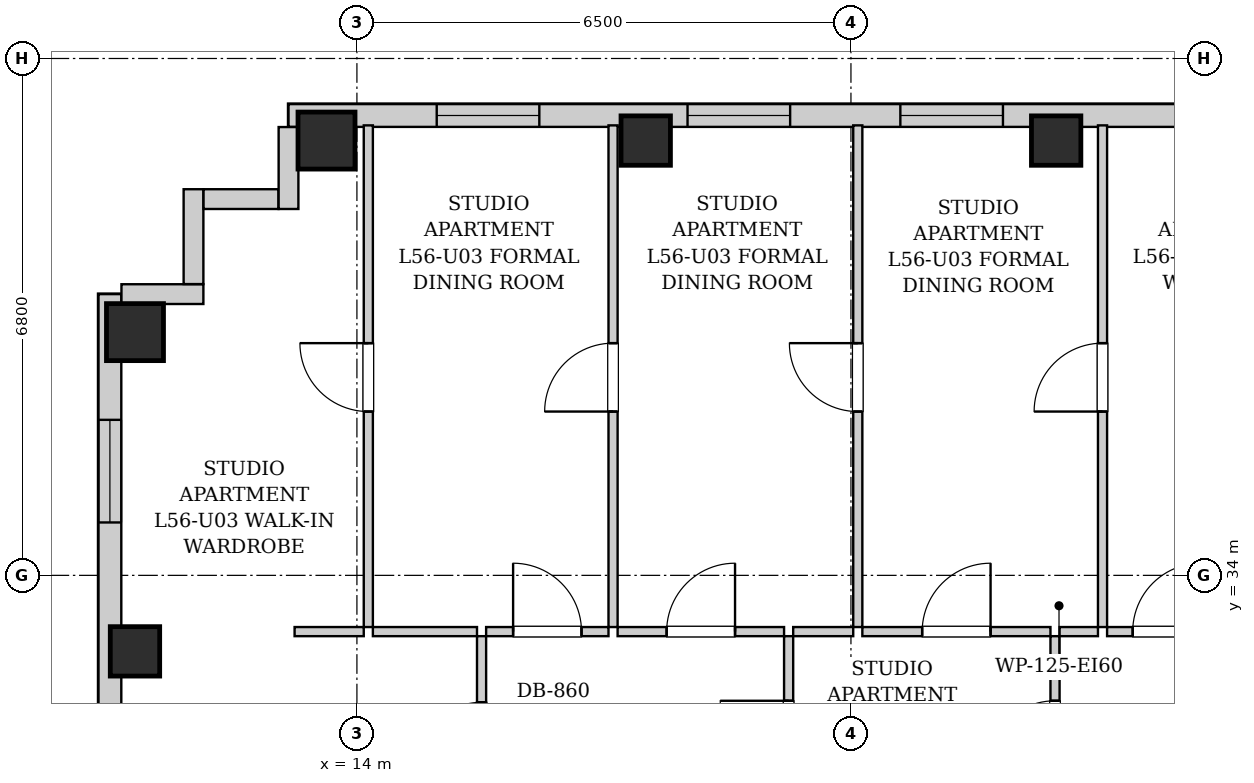
"""IFC4 building model, lengths in metres.
Left out: names, types, materials, properties, quantities, classifications, styles, units other than length and angle.
Written with IfcOpenShell. Run it as: python <this file> out.ifc"""

import sys

from ifc_helpers import new_model, si_unit, direction, frame, frame_2d, origin, origin_2d, place, context, subcontext, project, spatial, rectangle, extrude, element, fill, save


model = new_model("IFC4")
c1 = context("Model", 3, precision=1e-05, world=origin(), true_north=direction((0.0, 1.0)))
c2 = subcontext(c1, "Body", "Model", "MODEL_VIEW")
j1 = project(units=[si_unit("LENGTHUNIT", "METRE"), si_unit("PLANEANGLEUNIT", "RADIAN")], contexts=[c1])
p1 = place(None, origin())
s1 = spatial("IfcSite", under=j1, at=p1, CompositionType="ELEMENT")
p2 = place(p1, origin())
s2 = spatial("IfcBuilding", under=s1, at=p2, CompositionType="ELEMENT")
p3 = place(p2, frame((0.0, 0.0, 194.2)))
s3 = spatial("IfcBuildingStorey", under=s2, at=p3, CompositionType="ELEMENT", Elevation=194.2)
p4 = place(p3, frame((13.6, 39.72, 0.0), z_axis=(0.0, 0.0, 1.0), x_axis=(1.0, 0.0, 0.0)))
e1 = element("IfcColumn", 1, at=p4, inside=s3, PredefinedType="COLUMN", context=c2, shape_type="SweptSolid", body=[
    extrude(rectangle(XDim=0.75, YDim=0.75, at=origin_2d()), origin(), (0.0, 0.0, 1.0), 3.3),
])
for number, where, z_axis, x_axis in (
    (2, (17.8, 39.72, 0.0), (0.0, 0.0, 1.0), (1.0, 0.0, 0.0)),
    (3, (23.2, 39.72, 0.0), (0.0, 0.0, 1.0), (1.0, 0.0, 0.0)),
    (4, (11.08, 33.0, 0.0), (0.0, 0.0, 1.0), (1.0, 0.0, 0.0)),
):
    element("IfcColumn", number, at=place(p3, frame(where, z_axis=z_axis, x_axis=x_axis)), inside=s3, PredefinedType="COLUMN", context=c2, shape_type="SweptSolid", body=[
        extrude(rectangle(XDim=0.65, YDim=0.65, at=origin_2d()), origin(), (0.0, 0.0, 1.0), 3.3),
    ])
p5 = place(p3, frame((11.08, 37.2, 0.0), z_axis=(0.0, 0.0, 1.0), x_axis=(1.0, 0.0, 0.0)))
e5 = element("IfcColumn", 5, at=p5, inside=s3, PredefinedType="COLUMN", context=c2, shape_type="SweptSolid", body=[
    extrude(rectangle(XDim=0.75, YDim=0.75, at=origin_2d()), origin(), (0.0, 0.0, 1.0), 3.3),
])
p6 = place(p3, frame((13.1, 40.05, 0.0), z_axis=(0.0, 0.0, 1.0), x_axis=(1.0, 0.0, 0.0)))
e6 = element("IfcWall", 6, at=p6, inside=s3, PredefinedType="SOLIDWALL", context=c2, shape_type="SweptSolid", body=[
    extrude(rectangle(XDim=17.7, YDim=0.3, at=frame_2d((8.85, 0.0))), origin(), (0.0, 0.0, 1.0), 3.04),
])
p7 = place(p6, frame((1.95, 0.0, 0.55)))
e7 = element("IfcOpeningElement", 7, at=p7, cuts=e6, PredefinedType="OPENING", context=c2, shape_type="SweptSolid", body=[
    extrude(rectangle(XDim=1.35, YDim=1.2, at=frame_2d((0.675, 0.6))), frame((0.0, 0.16, 0.0), z_axis=(0.0, -1.0, 0.0), x_axis=(1.0, 0.0, 0.0)), (0.0, 0.0, 1.0), 0.32),
])
p8 = place(p6, frame((5.25, 0.0, 0.55)))
e8 = element("IfcOpeningElement", 8, at=p8, cuts=e6, PredefinedType="OPENING", context=c2, shape_type="SweptSolid", body=[
    extrude(rectangle(XDim=1.35, YDim=1.2, at=frame_2d((0.675, 0.6))), frame((0.0, 0.16, 0.0), z_axis=(0.0, -1.0, 0.0), x_axis=(1.0, 0.0, 0.0)), (0.0, 0.0, 1.0), 0.32),
])
p9 = place(p6, frame((8.05, 0.0, 0.55)))
e9 = element("IfcOpeningElement", 9, at=p9, cuts=e6, PredefinedType="OPENING", context=c2, shape_type="SweptSolid", body=[
    extrude(rectangle(XDim=1.35, YDim=1.2, at=frame_2d((0.675, 0.6))), frame((0.0, 0.16, 0.0), z_axis=(0.0, -1.0, 0.0), x_axis=(1.0, 0.0, 0.0)), (0.0, 0.0, 1.0), 0.32),
])
p10 = place(p6, frame((14.85, 0.0, 0.55)))
e10 = element("IfcOpeningElement", 10, at=p10, cuts=e6, PredefinedType="OPENING", context=c2, shape_type="SweptSolid", body=[
    extrude(rectangle(XDim=1.35, YDim=1.2, at=frame_2d((0.675, 0.6))), frame((0.0, 0.16, 0.0), z_axis=(0.0, -1.0, 0.0), x_axis=(1.0, 0.0, 0.0)), (0.0, 0.0, 1.0), 0.32),
])
p11 = place(p3, frame((10.75, 6.3, 0.0), z_axis=(0.0, 0.0, 1.0), x_axis=(0.0, 1.0, 0.0)))
e11 = element("IfcWall", 11, at=p11, inside=s3, PredefinedType="SOLIDWALL", context=c2, shape_type="SweptSolid", body=[
    extrude(rectangle(XDim=31.4, YDim=0.3, at=frame_2d((15.7, 0.0))), origin(), (0.0, 0.0, 1.0), 3.04),
])
p12 = place(p11, frame((1.653, 0.0, 0.55)))
e12 = element("IfcOpeningElement", 12, at=p12, cuts=e11, PredefinedType="OPENING", context=c2, shape_type="SweptSolid", body=[
    extrude(rectangle(XDim=1.35, YDim=1.2, at=frame_2d((0.675, 0.6))), frame((0.0, 0.16, 0.0), z_axis=(0.0, -1.0, 0.0), x_axis=(1.0, 0.0, 0.0)), (0.0, 0.0, 1.0), 0.32),
])
p13 = place(p11, frame((28.396, 0.0, 0.55)))
e13 = element("IfcOpeningElement", 13, at=p13, cuts=e11, PredefinedType="OPENING", context=c2, shape_type="SweptSolid", body=[
    extrude(rectangle(XDim=1.35, YDim=1.2, at=frame_2d((0.675, 0.6))), frame((0.0, 0.16, 0.0), z_axis=(0.0, -1.0, 0.0), x_axis=(1.0, 0.0, 0.0)), (0.0, 0.0, 1.0), 0.32),
])
p14 = place(p11, frame((10.367, 0.0, 0.55)))
e14 = element("IfcOpeningElement", 14, at=p14, cuts=e11, PredefinedType="OPENING", context=c2, shape_type="SweptSolid", body=[
    extrude(rectangle(XDim=1.35, YDim=1.2, at=frame_2d((0.675, 0.6))), frame((0.0, 0.16, 0.0), z_axis=(0.0, -1.0, 0.0), x_axis=(1.0, 0.0, 0.0)), (0.0, 0.0, 1.0), 0.32),
])
p15 = place(p11, frame((19.683, 0.0, 0.55)))
e15 = element("IfcOpeningElement", 15, at=p15, cuts=e11, PredefinedType="OPENING", context=c2, shape_type="SweptSolid", body=[
    extrude(rectangle(XDim=1.35, YDim=1.2, at=frame_2d((0.675, 0.6))), frame((0.0, 0.16, 0.0), z_axis=(0.0, -1.0, 0.0), x_axis=(1.0, 0.0, 0.0)), (0.0, 0.0, 1.0), 0.32),
])
p16 = place(p3, frame((10.902, 37.7, 0.0), z_axis=(0.0, 0.0, 1.0), x_axis=(1.0, 0.0, 0.0)))
e16 = element("IfcWall", 16, at=p16, inside=s3, PredefinedType="SOLIDWALL", context=c2, shape_type="SweptSolid", body=[
    extrude(rectangle(XDim=1.078, YDim=0.26, at=frame_2d((0.539, 0.0))), origin(), (0.0, 0.0, 1.0), 3.04),
])
p17 = place(p3, frame((11.85, 37.832, 0.0), z_axis=(0.0, 0.0, 1.0), x_axis=(0.0, 1.0, 0.0)))
e17 = element("IfcWall", 17, at=p17, inside=s3, PredefinedType="SOLIDWALL", context=c2, shape_type="SweptSolid", body=[
    extrude(rectangle(XDim=1.248, YDim=0.26, at=frame_2d((0.624, 0.0))), origin(), (0.0, 0.0, 1.0), 3.04),
])
p18 = place(p3, frame((11.982, 38.95, 0.0), z_axis=(0.0, 0.0, 1.0), x_axis=(1.0, 0.0, 0.0)))
e18 = element("IfcWall", 18, at=p18, inside=s3, PredefinedType="SOLIDWALL", context=c2, shape_type="SweptSolid", body=[
    extrude(rectangle(XDim=0.986, YDim=0.26, at=frame_2d((0.493, 0.0))), origin(), (0.0, 0.0, 1.0), 3.04),
])
p19 = place(p3, frame((13.1, 38.82, 0.0), z_axis=(0.0, 0.0, 1.0), x_axis=(0.0, 1.0, 0.0)))
e19 = element("IfcWall", 19, at=p19, inside=s3, PredefinedType="SOLIDWALL", context=c2, shape_type="SweptSolid", body=[
    extrude(rectangle(XDim=1.078, YDim=0.26, at=frame_2d((0.539, 0.0))), origin(), (0.0, 0.0, 1.0), 3.04),
])
p20 = place(p3, frame((15.64, 30.6, 0.0), z_axis=(0.0, 0.0, 1.0), x_axis=(0.0, 1.0, 0.0)))
e20 = element("IfcWall", 20, at=p20, inside=s3, PredefinedType="PARTITIONING", context=c2, shape_type="SweptSolid", body=[
    extrude(rectangle(XDim=2.6, YDim=0.12, at=frame_2d((1.3, 0.0))), origin(), (0.0, 0.0, 1.0), 3.04),
])
p21 = place(p20, frame((0.87, 0.0, 0.0)))
e21 = element("IfcOpeningElement", 21, at=p21, cuts=e20, PredefinedType="OPENING", context=c2, shape_type="SweptSolid", body=[
    extrude(rectangle(XDim=0.86, YDim=2.05, at=frame_2d((0.43, 1.025))), frame((0.0, 0.07, 0.0), z_axis=(0.0, -1.0, 0.0), x_axis=(1.0, 0.0, 0.0)), (0.0, 0.0, 1.0), 0.14),
])
p22 = place(p3, frame((13.18, 33.26, 0.0), z_axis=(0.0, 0.0, 1.0), x_axis=(1.0, 0.0, 0.0)))
e22 = element("IfcWall", 22, at=p22, inside=s3, PredefinedType="PARTITIONING", context=c2, shape_type="SweptSolid", body=[
    extrude(rectangle(XDim=0.91, YDim=0.12, at=frame_2d((0.455, 0.0))), origin(), (0.0, 0.0, 1.0), 3.04),
])
p23 = place(p3, frame((14.21, 33.26, 0.0), z_axis=(0.0, 0.0, 1.0), x_axis=(1.0, 0.0, 0.0)))
e23 = element("IfcWall", 23, at=p23, inside=s3, PredefinedType="PARTITIONING", context=c2, shape_type="SweptSolid", body=[
    extrude(rectangle(XDim=1.37, YDim=0.12, at=frame_2d((0.685, 0.0))), origin(), (0.0, 0.0, 1.0), 3.04),
])
p24 = place(p3, frame((19.68, 30.6, 0.0), z_axis=(0.0, 0.0, 1.0), x_axis=(0.0, 1.0, 0.0)))
e24 = element("IfcWall", 24, at=p24, inside=s3, PredefinedType="PARTITIONING", context=c2, shape_type="SweptSolid", body=[
    extrude(rectangle(XDim=2.6, YDim=0.12, at=frame_2d((1.3, 0.0))), origin(), (0.0, 0.0, 1.0), 3.04),
])
p25 = place(p24, frame((0.85, 0.0, 0.0)))
e25 = element("IfcOpeningElement", 25, at=p25, cuts=e24, PredefinedType="OPENING", context=c2, shape_type="SweptSolid", body=[
    extrude(rectangle(XDim=0.9, YDim=2.05, at=frame_2d((0.45, 1.025))), frame((0.0, 0.07, 0.0), z_axis=(0.0, -1.0, 0.0), x_axis=(1.0, 0.0, 0.0)), (0.0, 0.0, 1.0), 0.14),
])
p26 = place(p3, frame((15.7, 33.26, 0.0), z_axis=(0.0, 0.0, 1.0), x_axis=(1.0, 0.0, 0.0)))
e26 = element("IfcWall", 26, at=p26, inside=s3, PredefinedType="PARTITIONING", context=c2, shape_type="SweptSolid", body=[
    extrude(rectangle(XDim=1.61, YDim=0.12, at=frame_2d((0.805, 0.0))), origin(), (0.0, 0.0, 1.0), 3.04),
])
p27 = place(p26, frame((0.355, 0.0, 0.0)))
e27 = element("IfcOpeningElement", 27, at=p27, cuts=e26, PredefinedType="OPENING", context=c2, shape_type="SweptSolid", body=[
    extrude(rectangle(XDim=0.9, YDim=2.05, at=frame_2d((0.45, 1.025))), frame((0.0, 0.07, 0.0), z_axis=(0.0, -1.0, 0.0), x_axis=(1.0, 0.0, 0.0)), (0.0, 0.0, 1.0), 0.14),
])
p28 = place(p3, frame((17.43, 33.26, 0.0), z_axis=(0.0, 0.0, 1.0), x_axis=(1.0, 0.0, 0.0)))
e28 = element("IfcWall", 28, at=p28, inside=s3, PredefinedType="PARTITIONING", context=c2, shape_type="SweptSolid", body=[
    extrude(rectangle(XDim=2.19, YDim=0.12, at=frame_2d((1.095, 0.0))), origin(), (0.0, 0.0, 1.0), 3.04),
])
p29 = place(p28, frame((0.645, 0.0, 0.0)))
e29 = element("IfcOpeningElement", 29, at=p29, cuts=e28, PredefinedType="OPENING", context=c2, shape_type="SweptSolid", body=[
    extrude(rectangle(XDim=0.9, YDim=2.05, at=frame_2d((0.45, 1.025))), frame((0.0, 0.07, 0.0), z_axis=(0.0, -1.0, 0.0), x_axis=(1.0, 0.0, 0.0)), (0.0, 0.0, 1.0), 0.14),
])
p30 = place(p3, frame((23.185, 30.6, 0.0), z_axis=(0.0, 0.0, 1.0), x_axis=(0.0, 1.0, 0.0)))
e30 = element("IfcWall", 30, at=p30, inside=s3, PredefinedType="PARTITIONING", context=c2, shape_type="SweptSolid", body=[
    extrude(rectangle(XDim=2.6, YDim=0.12, at=frame_2d((1.3, 0.0))), origin(), (0.0, 0.0, 1.0), 3.04),
])
p31 = place(p30, frame((0.85, 0.0, 0.0)))
e31 = element("IfcOpeningElement", 31, at=p31, cuts=e30, PredefinedType="OPENING", context=c2, shape_type="SweptSolid", body=[
    extrude(rectangle(XDim=0.9, YDim=2.05, at=frame_2d((0.45, 1.025))), frame((0.0, 0.07, 0.0), z_axis=(0.0, -1.0, 0.0), x_axis=(1.0, 0.0, 0.0)), (0.0, 0.0, 1.0), 0.14),
])
p32 = place(p3, frame((19.74, 33.26, 0.0), z_axis=(0.0, 0.0, 1.0), x_axis=(1.0, 0.0, 0.0)))
e32 = element("IfcWall", 32, at=p32, inside=s3, PredefinedType="PARTITIONING", context=c2, shape_type="SweptSolid", body=[
    extrude(rectangle(XDim=0.79, YDim=0.12, at=frame_2d((0.395, 0.0))), origin(), (0.0, 0.0, 1.0), 3.04),
])
p33 = place(p3, frame((20.65, 33.26, 0.0), z_axis=(0.0, 0.0, 1.0), x_axis=(1.0, 0.0, 0.0)))
e33 = element("IfcWall", 33, at=p33, inside=s3, PredefinedType="PARTITIONING", context=c2, shape_type="SweptSolid", body=[
    extrude(rectangle(XDim=2.475, YDim=0.12, at=frame_2d((1.238, 0.0))), origin(), (0.0, 0.0, 1.0), 3.04),
])
p34 = place(p33, frame((0.787, 0.0, 0.0)))
e34 = element("IfcOpeningElement", 34, at=p34, cuts=e33, PredefinedType="OPENING", context=c2, shape_type="SweptSolid", body=[
    extrude(rectangle(XDim=0.9, YDim=2.05, at=frame_2d((0.45, 1.025))), frame((0.0, 0.07, 0.0), z_axis=(0.0, -1.0, 0.0), x_axis=(1.0, 0.0, 0.0)), (0.0, 0.0, 1.0), 0.14),
])
p35 = place(p3, frame((23.245, 33.26, 0.0), z_axis=(0.0, 0.0, 1.0), x_axis=(1.0, 0.0, 0.0)))
e35 = element("IfcWall", 35, at=p35, inside=s3, PredefinedType="PARTITIONING", context=c2, shape_type="SweptSolid", body=[
    extrude(rectangle(XDim=0.505, YDim=0.12, at=frame_2d((0.252, 0.0))), origin(), (0.0, 0.0, 1.0), 3.04),
])
p36 = place(p3, frame((23.87, 33.26, 0.0), z_axis=(0.0, 0.0, 1.0), x_axis=(1.0, 0.0, 0.0)))
e36 = element("IfcWall", 36, at=p36, inside=s3, PredefinedType="PARTITIONING", context=c2, shape_type="SweptSolid", body=[
    extrude(rectangle(XDim=1.575, YDim=0.12, at=frame_2d((0.788, 0.0))), origin(), (0.0, 0.0, 1.0), 3.04),
])
p37 = place(p36, frame((0.337, 0.0, 0.0)))
e37 = element("IfcOpeningElement", 37, at=p37, cuts=e36, PredefinedType="OPENING", context=c2, shape_type="SweptSolid", body=[
    extrude(rectangle(XDim=0.9, YDim=2.05, at=frame_2d((0.45, 1.025))), frame((0.0, 0.07, 0.0), z_axis=(0.0, -1.0, 0.0), x_axis=(1.0, 0.0, 0.0)), (0.0, 0.0, 1.0), 0.14),
])
p38 = place(p3, frame((14.15, 33.32, 0.0), z_axis=(0.0, 0.0, 1.0), x_axis=(0.0, 1.0, 0.0)))
e38 = element("IfcWall", 38, at=p38, inside=s3, PredefinedType="PARTITIONING", context=c2, shape_type="SweptSolid", body=[
    extrude(rectangle(XDim=6.6, YDim=0.12, at=frame_2d((3.3, 0.0))), origin(), (0.0, 0.0, 1.0), 3.04),
])
p39 = place(p38, frame((2.835, 0.0, 0.0)))
e39 = element("IfcOpeningElement", 39, at=p39, cuts=e38, PredefinedType="OPENING", context=c2, shape_type="SweptSolid", body=[
    extrude(rectangle(XDim=0.9, YDim=2.05, at=frame_2d((0.45, 1.025))), frame((0.0, 0.07, 0.0), z_axis=(0.0, -1.0, 0.0), x_axis=(1.0, 0.0, 0.0)), (0.0, 0.0, 1.0), 0.14),
])
p40 = place(p3, frame((17.37, 33.32, 0.0), z_axis=(0.0, 0.0, 1.0), x_axis=(0.0, 1.0, 0.0)))
e40 = element("IfcWall", 40, at=p40, inside=s3, PredefinedType="PARTITIONING", context=c2, shape_type="SweptSolid", body=[
    extrude(rectangle(XDim=6.6, YDim=0.12, at=frame_2d((3.3, 0.0))), origin(), (0.0, 0.0, 1.0), 3.04),
])
p41 = place(p40, frame((2.835, 0.0, 0.0)))
e41 = element("IfcOpeningElement", 41, at=p41, cuts=e40, PredefinedType="OPENING", context=c2, shape_type="SweptSolid", body=[
    extrude(rectangle(XDim=0.9, YDim=2.05, at=frame_2d((0.45, 1.025))), frame((0.0, 0.07, 0.0), z_axis=(0.0, -1.0, 0.0), x_axis=(1.0, 0.0, 0.0)), (0.0, 0.0, 1.0), 0.14),
])
p42 = place(p3, frame((20.59, 33.32, 0.0), z_axis=(0.0, 0.0, 1.0), x_axis=(0.0, 1.0, 0.0)))
e42 = element("IfcWall", 42, at=p42, inside=s3, PredefinedType="PARTITIONING", context=c2, shape_type="SweptSolid", body=[
    extrude(rectangle(XDim=6.6, YDim=0.12, at=frame_2d((3.3, 0.0))), origin(), (0.0, 0.0, 1.0), 3.04),
])
p43 = place(p42, frame((2.835, 0.0, 0.0)))
e43 = element("IfcOpeningElement", 43, at=p43, cuts=e42, PredefinedType="OPENING", context=c2, shape_type="SweptSolid", body=[
    extrude(rectangle(XDim=0.9, YDim=2.05, at=frame_2d((0.45, 1.025))), frame((0.0, 0.07, 0.0), z_axis=(0.0, -1.0, 0.0), x_axis=(1.0, 0.0, 0.0)), (0.0, 0.0, 1.0), 0.14),
])
p44 = place(p3, frame((23.81, 33.32, 0.0), z_axis=(0.0, 0.0, 1.0), x_axis=(0.0, 1.0, 0.0)))
e44 = element("IfcWall", 44, at=p44, inside=s3, PredefinedType="PARTITIONING", context=c2, shape_type="SweptSolid", body=[
    extrude(rectangle(XDim=6.6, YDim=0.12, at=frame_2d((3.3, 0.0))), origin(), (0.0, 0.0, 1.0), 3.04),
])
p45 = place(p44, frame((2.835, 0.0, 0.0)))
e45 = element("IfcOpeningElement", 45, at=p45, cuts=e44, PredefinedType="OPENING", context=c2, shape_type="SweptSolid", body=[
    extrude(rectangle(XDim=0.9, YDim=2.05, at=frame_2d((0.45, 1.025))), frame((0.0, 0.07, 0.0), z_axis=(0.0, -1.0, 0.0), x_axis=(1.0, 0.0, 0.0)), (0.0, 0.0, 1.0), 0.14),
])
p46 = place(p21, origin())
e46 = element("IfcDoor", 46, at=p46, inside=s3, OperationType="SINGLE_SWING_LEFT", PredefinedType="DOOR", context=c2, shape_type="SweptSolid", body=[
    extrude(rectangle(XDim=0.86, YDim=2.05, at=frame_2d((0.43, 1.025))), frame((0.0, 0.025, 0.0), z_axis=(0.0, -1.0, 0.0), x_axis=(1.0, 0.0, 0.0)), (0.0, 0.0, 1.0), 0.05),
])
fill(e21, e46)
p47 = place(p25, origin())
e47 = element("IfcDoor", 47, at=p47, inside=s3, OperationType="SINGLE_SWING_RIGHT", PredefinedType="DOOR", context=c2, shape_type="SweptSolid", body=[
    extrude(rectangle(XDim=0.9, YDim=2.05, at=frame_2d((0.45, 1.025))), frame((0.0, 0.025, 0.0), z_axis=(0.0, -1.0, 0.0), x_axis=(1.0, 0.0, 0.0)), (0.0, 0.0, 1.0), 0.05),
])
fill(e25, e47)
p48 = place(p27, origin())
e48 = element("IfcDoor", 48, at=p48, inside=s3, OperationType="SINGLE_SWING_LEFT", PredefinedType="DOOR", context=c2, shape_type="SweptSolid", body=[
    extrude(rectangle(XDim=0.9, YDim=2.05, at=frame_2d((0.45, 1.025))), frame((0.0, 0.025, 0.0), z_axis=(0.0, -1.0, 0.0), x_axis=(1.0, 0.0, 0.0)), (0.0, 0.0, 1.0), 0.05),
])
fill(e27, e48)
p49 = place(p29, origin())
e49 = element("IfcDoor", 49, at=p49, inside=s3, OperationType="SINGLE_SWING_RIGHT", PredefinedType="DOOR", context=c2, shape_type="SweptSolid", body=[
    extrude(rectangle(XDim=0.9, YDim=2.05, at=frame_2d((0.45, 1.025))), frame((0.0, 0.025, 0.0), z_axis=(0.0, -1.0, 0.0), x_axis=(1.0, 0.0, 0.0)), (0.0, 0.0, 1.0), 0.05),
])
fill(e29, e49)
p50 = place(p31, origin())
e50 = element("IfcDoor", 50, at=p50, inside=s3, OperationType="SINGLE_SWING_LEFT", PredefinedType="DOOR", context=c2, shape_type="SweptSolid", body=[
    extrude(rectangle(XDim=0.9, YDim=2.05, at=frame_2d((0.45, 1.025))), frame((0.0, 0.025, 0.0), z_axis=(0.0, -1.0, 0.0), x_axis=(1.0, 0.0, 0.0)), (0.0, 0.0, 1.0), 0.05),
])
fill(e31, e50)
p51 = place(p34, origin())
e51 = element("IfcDoor", 51, at=p51, inside=s3, OperationType="SINGLE_SWING_RIGHT", PredefinedType="DOOR", context=c2, shape_type="SweptSolid", body=[
    extrude(rectangle(XDim=0.9, YDim=2.05, at=frame_2d((0.45, 1.025))), frame((0.0, 0.025, 0.0), z_axis=(0.0, -1.0, 0.0), x_axis=(1.0, 0.0, 0.0)), (0.0, 0.0, 1.0), 0.05),
])
fill(e34, e51)
p52 = place(p37, origin())
e52 = element("IfcDoor", 52, at=p52, inside=s3, OperationType="SINGLE_SWING_RIGHT", PredefinedType="DOOR", context=c2, shape_type="SweptSolid", body=[
    extrude(rectangle(XDim=0.9, YDim=2.05, at=frame_2d((0.45, 1.025))), frame((0.0, 0.025, 0.0), z_axis=(0.0, -1.0, 0.0), x_axis=(1.0, 0.0, 0.0)), (0.0, 0.0, 1.0), 0.05),
])
fill(e37, e52)
p53 = place(p39, origin())
e53 = element("IfcDoor", 53, at=p53, inside=s3, OperationType="SINGLE_SWING_RIGHT", PredefinedType="DOOR", context=c2, shape_type="SweptSolid", body=[
    extrude(rectangle(XDim=0.9, YDim=2.05, at=frame_2d((0.45, 1.025))), frame((0.0, 0.025, 0.0), z_axis=(0.0, -1.0, 0.0), x_axis=(1.0, 0.0, 0.0)), (0.0, 0.0, 1.0), 0.05),
])
fill(e39, e53)
p54 = place(p41, origin())
e54 = element("IfcDoor", 54, at=p54, inside=s3, OperationType="SINGLE_SWING_LEFT", PredefinedType="DOOR", context=c2, shape_type="SweptSolid", body=[
    extrude(rectangle(XDim=0.9, YDim=2.05, at=frame_2d((0.45, 1.025))), frame((0.0, 0.025, 0.0), z_axis=(0.0, -1.0, 0.0), x_axis=(1.0, 0.0, 0.0)), (0.0, 0.0, 1.0), 0.05),
])
fill(e41, e54)
p55 = place(p43, origin())
e55 = element("IfcDoor", 55, at=p55, inside=s3, OperationType="SINGLE_SWING_RIGHT", PredefinedType="DOOR", context=c2, shape_type="SweptSolid", body=[
    extrude(rectangle(XDim=0.9, YDim=2.05, at=frame_2d((0.45, 1.025))), frame((0.0, 0.025, 0.0), z_axis=(0.0, -1.0, 0.0), x_axis=(1.0, 0.0, 0.0)), (0.0, 0.0, 1.0), 0.05),
])
fill(e43, e55)
p56 = place(p45, origin())
e56 = element("IfcDoor", 56, at=p56, inside=s3, OperationType="SINGLE_SWING_LEFT", PredefinedType="DOOR", context=c2, shape_type="SweptSolid", body=[
    extrude(rectangle(XDim=0.9, YDim=2.05, at=frame_2d((0.45, 1.025))), frame((0.0, 0.025, 0.0), z_axis=(0.0, -1.0, 0.0), x_axis=(1.0, 0.0, 0.0)), (0.0, 0.0, 1.0), 0.05),
])
fill(e45, e56)
p57 = place(p13, origin())
e57 = element("IfcWindow", 57, at=p57, inside=s3, PartitioningType="SINGLE_PANEL", PredefinedType="WINDOW", context=c2, shape_type="SweptSolid", body=[
    extrude(rectangle(XDim=1.35, YDim=1.2, at=frame_2d((0.675, 0.6))), frame((0.0, 0.03, 0.0), z_axis=(0.0, -1.0, 0.0), x_axis=(1.0, 0.0, 0.0)), (0.0, 0.0, 1.0), 0.06),
])
fill(e13, e57)
p58 = place(p7, origin())
e58 = element("IfcWindow", 58, at=p58, inside=s3, PartitioningType="SINGLE_PANEL", PredefinedType="WINDOW", context=c2, shape_type="SweptSolid", body=[
    extrude(rectangle(XDim=1.35, YDim=1.2, at=frame_2d((0.675, 0.6))), frame((0.0, 0.03, 0.0), z_axis=(0.0, -1.0, 0.0), x_axis=(1.0, 0.0, 0.0)), (0.0, 0.0, 1.0), 0.06),
])
fill(e7, e58)
p59 = place(p8, origin())
e59 = element("IfcWindow", 59, at=p59, inside=s3, PartitioningType="SINGLE_PANEL", PredefinedType="WINDOW", context=c2, shape_type="SweptSolid", body=[
    extrude(rectangle(XDim=1.35, YDim=1.2, at=frame_2d((0.675, 0.6))), frame((0.0, 0.03, 0.0), z_axis=(0.0, -1.0, 0.0), x_axis=(1.0, 0.0, 0.0)), (0.0, 0.0, 1.0), 0.06),
])
fill(e8, e59)
p60 = place(p9, origin())
e60 = element("IfcWindow", 60, at=p60, inside=s3, PartitioningType="SINGLE_PANEL", PredefinedType="WINDOW", context=c2, shape_type="SweptSolid", body=[
    extrude(rectangle(XDim=1.35, YDim=1.2, at=frame_2d((0.675, 0.6))), frame((0.0, 0.03, 0.0), z_axis=(0.0, -1.0, 0.0), x_axis=(1.0, 0.0, 0.0)), (0.0, 0.0, 1.0), 0.06),
])
fill(e9, e60)
save(model, sys.argv[1])
